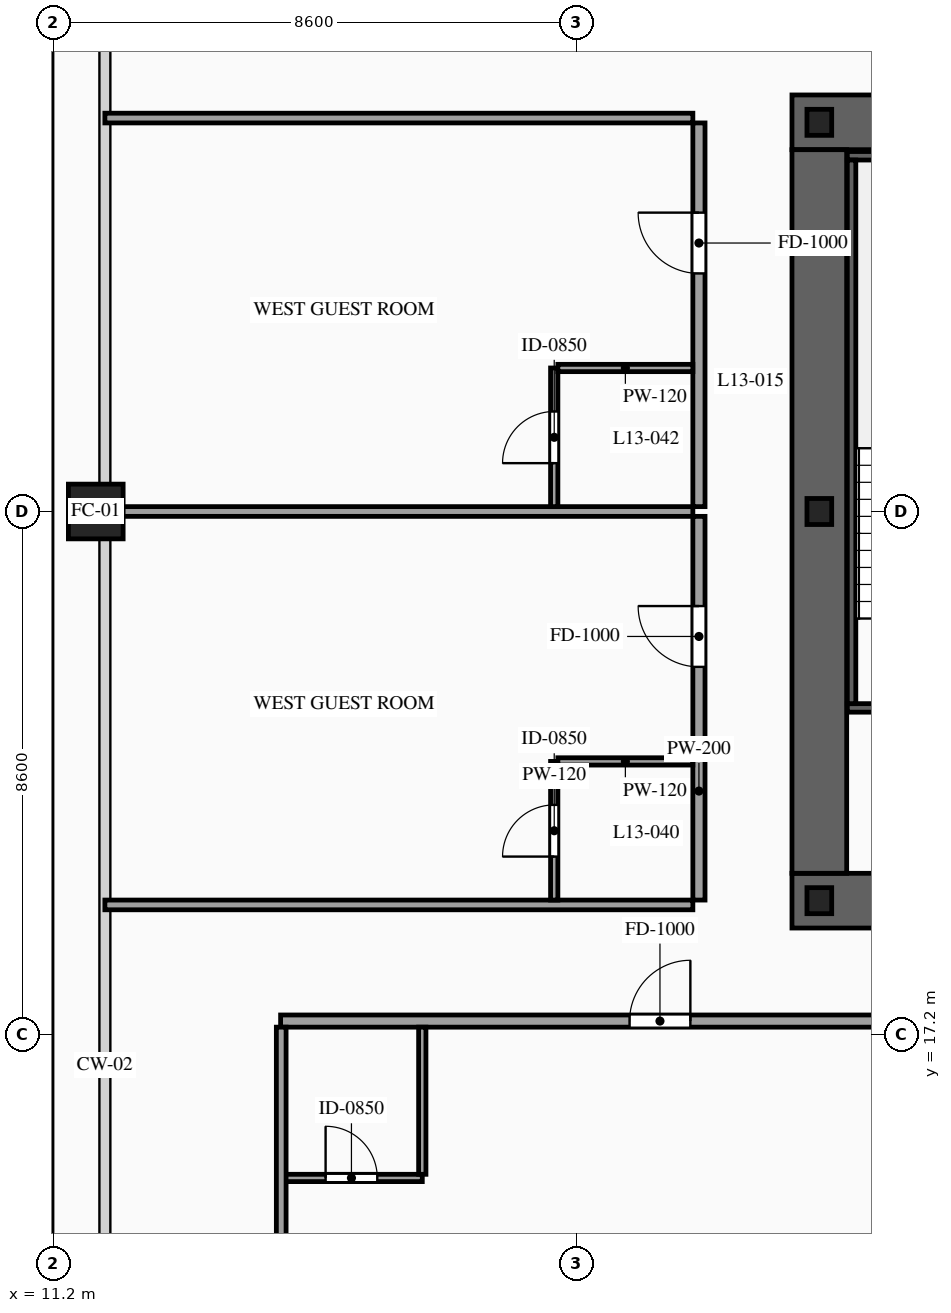
"""IFC4 building model, lengths in metres.
Left out: names, types, materials, properties, quantities, classifications, styles, units other than length and angle.
Written with IfcOpenShell. Run it as: python <this file> out.ifc"""

import sys

from ifc_helpers import new_model, si_unit, direction, frame, frame_2d, origin, origin_2d, place, context, subcontext, project, spatial, rectangle, hollow_rectangle, i_section, extrude, source, transform, mapped, element, fill, save


model = new_model("IFC4")
c1 = context("Model", 3, precision=1e-05, world=origin(), true_north=direction((0.0, 1.0)))
c2 = subcontext(c1, "Body", "Model", "MODEL_VIEW")
j1 = project(units=[si_unit("LENGTHUNIT", "METRE"), si_unit("PLANEANGLEUNIT", "RADIAN")], contexts=[c1])
p1 = place(None, origin())
s1 = spatial("IfcSite", under=j1, at=p1, CompositionType="ELEMENT")
p2 = place(p1, origin())
s2 = spatial("IfcBuilding", under=s1, at=p2, CompositionType="ELEMENT")
p3 = place(p2, frame((0.0, 0.0, 53.2)))
s3 = spatial("IfcBuildingStorey", under=s2, at=p3, CompositionType="ELEMENT", Elevation=53.2)
p4 = place(p3, frame((23.35, 19.4, 0.0), z_axis=(0.0, 0.0, 1.0), x_axis=(1.0, 0.0, 0.0)))
e1 = element("IfcWall", 1, at=p4, inside=s3, PredefinedType="SHEAR", context=c2, shape_type="SweptSolid", body=[
    extrude(rectangle(XDim=27.3, YDim=0.9, at=frame_2d((13.65, 0.0))), origin(), (0.0, 0.0, 1.0), 3.6),
])
p5 = place(p4, frame((2.1, 0.0, 0.0)))
e2 = element("IfcOpeningElement", 2, at=p5, cuts=e1, PredefinedType="OPENING", context=c2, shape_type="SweptSolid", body=[
    extrude(rectangle(XDim=1.1, YDim=2.2, at=frame_2d((0.55, 1.1))), frame((0.0, 0.465, 0.0), z_axis=(0.0, -1.0, 0.0), x_axis=(1.0, 0.0, 0.0)), (0.0, 0.0, 1.0), 0.93),
])
p6 = place(p4, frame((10.0, 0.0, 0.0)))
e3 = element("IfcOpeningElement", 3, at=p6, cuts=e1, PredefinedType="OPENING", context=c2, shape_type="SweptSolid", body=[
    extrude(rectangle(XDim=1.1, YDim=2.2, at=frame_2d((0.55, 1.1))), frame((0.0, 0.465, 0.0), z_axis=(0.0, -1.0, 0.0), x_axis=(1.0, 0.0, 0.0)), (0.0, 0.0, 1.0), 0.93),
])
p7 = place(p4, frame((23.2, 0.0, 0.0)))
e4 = element("IfcOpeningElement", 4, at=p7, cuts=e1, PredefinedType="OPENING", context=c2, shape_type="SweptSolid", body=[
    extrude(rectangle(XDim=1.1, YDim=2.2, at=frame_2d((0.55, 1.1))), frame((0.0, 0.465, 0.0), z_axis=(0.0, -1.0, 0.0), x_axis=(1.0, 0.0, 0.0)), (0.0, 0.0, 1.0), 0.93),
])
p8 = place(p4, frame((19.82, 0.0, 0.0)))
e5 = element("IfcOpeningElement", 5, at=p8, cuts=e1, PredefinedType="OPENING", context=c2, shape_type="SweptSolid", body=[
    extrude(rectangle(XDim=0.9, YDim=2.15, at=frame_2d((0.45, 1.075))), frame((0.0, 0.465, 0.0), z_axis=(0.0, -1.0, 0.0), x_axis=(1.0, 0.0, 0.0)), (0.0, 0.0, 1.0), 0.93),
])
p9 = place(p4, frame((18.38, 0.0, 0.0)))
e6 = element("IfcOpeningElement", 6, at=p9, cuts=e1, PredefinedType="OPENING", context=c2, shape_type="SweptSolid", body=[
    extrude(rectangle(XDim=0.9, YDim=2.15, at=frame_2d((0.45, 1.075))), frame((0.0, 0.465, 0.0), z_axis=(0.0, -1.0, 0.0), x_axis=(1.0, 0.0, 0.0)), (0.0, 0.0, 1.0), 0.93),
])
p10 = place(p3, frame((23.35, 32.2, 0.0), z_axis=(0.0, 0.0, 1.0), x_axis=(1.0, 0.0, 0.0)))
e7 = element("IfcWall", 7, at=p10, inside=s3, PredefinedType="SHEAR", context=c2, shape_type="SweptSolid", body=[
    extrude(rectangle(XDim=27.3, YDim=0.9, at=frame_2d((13.65, 0.0))), origin(), (0.0, 0.0, 1.0), 3.6),
])
p11 = place(p10, frame((4.72, 0.0, 0.0)))
e8 = element("IfcOpeningElement", 8, at=p11, cuts=e7, PredefinedType="OPENING", context=c2, shape_type="SweptSolid", body=[
    extrude(rectangle(XDim=0.9, YDim=2.15, at=frame_2d((0.45, 1.075))), frame((0.0, 0.465, 0.0), z_axis=(0.0, -1.0, 0.0), x_axis=(1.0, 0.0, 0.0)), (0.0, 0.0, 1.0), 0.93),
])
p12 = place(p10, frame((10.0, 0.0, 0.0)))
e9 = element("IfcOpeningElement", 9, at=p12, cuts=e7, PredefinedType="OPENING", context=c2, shape_type="SweptSolid", body=[
    extrude(rectangle(XDim=1.1, YDim=2.2, at=frame_2d((0.55, 1.1))), frame((0.0, 0.465, 0.0), z_axis=(0.0, -1.0, 0.0), x_axis=(1.0, 0.0, 0.0)), (0.0, 0.0, 1.0), 0.93),
])
p13 = place(p10, frame((15.85, 0.0, 0.0)))
e10 = element("IfcOpeningElement", 10, at=p13, cuts=e7, PredefinedType="OPENING", context=c2, shape_type="SweptSolid", body=[
    extrude(rectangle(XDim=1.1, YDim=2.2, at=frame_2d((0.55, 1.1))), frame((0.0, 0.465, 0.0), z_axis=(0.0, -1.0, 0.0), x_axis=(1.0, 0.0, 0.0)), (0.0, 0.0, 1.0), 0.93),
])
p14 = place(p10, frame((19.05, 0.0, 0.0)))
e11 = element("IfcOpeningElement", 11, at=p14, cuts=e7, PredefinedType="OPENING", context=c2, shape_type="SweptSolid", body=[
    extrude(rectangle(XDim=0.9, YDim=2.15, at=frame_2d((0.45, 1.075))), frame((0.0, 0.465, 0.0), z_axis=(0.0, -1.0, 0.0), x_axis=(1.0, 0.0, 0.0)), (0.0, 0.0, 1.0), 0.93),
])
m1 = source(origin(), c2, "Body", "SweptSolid", [
    extrude(rectangle(XDim=11.9, YDim=0.9, at=frame_2d((5.95, 0.0))), origin(), (0.0, 0.0, 1.0), 3.6),
])
p15 = place(p3, frame((23.8, 19.85, 0.0), z_axis=(0.0, 0.0, 1.0), x_axis=(0.0, 1.0, 0.0)))
e12 = element("IfcWall", 12, at=p15, inside=s3, PredefinedType="SHEAR", context=c2, shape_type="MappedRepresentation", body=[
    mapped(m1, transform((0.0, 0.0, 0.0), scale=1.0)),
])
m2 = source(origin(), c2, "Body", "SweptSolid", [
    extrude(i_section(OverallWidth=0.407, OverallDepth=0.428, WebThickness=0.02, FlangeThickness=0.035, at=origin_2d()), origin(), (0.0, 0.0, 1.0), 3.6),
])
for number, where, z_axis, x_axis in (
    (13, (23.8, 19.4, 0.0), (0.0, 0.0, 1.0), (1.0, 0.0, 0.0)),
    (14, (23.8, 25.8, 0.0), (0.0, 0.0, 1.0), (1.0, 0.0, 0.0)),
    (15, (23.8, 32.2, 0.0), (0.0, 0.0, 1.0), (1.0, 0.0, 0.0)),
):
    element("IfcColumn", number, at=place(p3, frame(where, z_axis=z_axis, x_axis=x_axis)), inside=s3, PredefinedType="COLUMN", context=c2, shape_type="MappedRepresentation", body=[
        mapped(m2, transform((0.0, 0.0, 0.0), scale=1.0)),
    ])
m3 = source(origin(), c2, "Body", "SweptSolid", [
    extrude(hollow_rectangle(XDim=0.9, YDim=0.9, WallThickness=0.042, at=origin_2d()), origin(), (0.0, 0.0, 1.0), 3.6),
])
p16 = place(p3, frame((11.9, 25.8, 0.0), z_axis=(0.0, 0.0, 1.0), x_axis=(1.0, 0.0, 0.0)))
e16 = element("IfcColumn", 16, at=p16, inside=s3, PredefinedType="COLUMN", context=c2, shape_type="MappedRepresentation", body=[
    mapped(m3, transform((0.0, 0.0, 0.0), scale=1.0)),
])
p17 = place(p3, frame((24.26, 22.57, 0.0), z_axis=(0.0, 0.0, 1.0), x_axis=(1.0, 0.0, 0.0)))
e17 = element("IfcWall", 17, at=p17, inside=s3, PredefinedType="SOLIDWALL", context=c2, shape_type="SweptSolid", body=[
    extrude(rectangle(XDim=3.28, YDim=0.14, at=frame_2d((1.64, 0.0))), origin(), (0.0, 0.0, 1.0), 3.38),
])
p18 = place(p17, frame((1.09, 0.0, 0.0)))
e18 = element("IfcOpeningElement", 18, at=p18, cuts=e17, PredefinedType="OPENING", context=c2, shape_type="SweptSolid", body=[
    extrude(rectangle(XDim=1.1, YDim=2.2, at=frame_2d((0.55, 1.1))), frame((0.0, 0.085, 0.0), z_axis=(0.0, -1.0, 0.0), x_axis=(1.0, 0.0, 0.0)), (0.0, 0.0, 1.0), 0.17),
])
m4 = source(origin(), c2, "Body", "SweptSolid", [
    extrude(rectangle(XDim=3.28, YDim=0.14, at=frame_2d((1.64, 0.0))), origin(), (0.0, 0.0, 1.0), 3.38),
])
p19 = place(p3, frame((24.26, 31.65, 0.0), z_axis=(0.0, 0.0, 1.0), x_axis=(1.0, 0.0, 0.0)))
e19 = element("IfcWall", 19, at=p19, inside=s3, PredefinedType="SOLIDWALL", context=c2, shape_type="MappedRepresentation", body=[
    mapped(m4, transform((0.0, 0.0, 0.0), scale=1.0)),
])
m5 = source(origin(), c2, "Body", "SweptSolid", [
    extrude(rectangle(XDim=8.94, YDim=0.14, at=frame_2d((4.47, 0.0))), origin(), (0.0, 0.0, 1.0), 3.38),
])
p20 = place(p3, frame((24.33, 22.64, 0.0), z_axis=(0.0, 0.0, 1.0), x_axis=(0.0, 1.0, 0.0)))
e20 = element("IfcWall", 20, at=p20, inside=s3, PredefinedType="SOLIDWALL", context=c2, shape_type="MappedRepresentation", body=[
    mapped(m5, transform((0.0, 0.0, 0.0), scale=1.0)),
])
p21 = place(p3, frame((14.94, 17.42, 0.0), z_axis=(0.0, 0.0, 1.0), x_axis=(1.0, 0.0, 0.0)))
e21 = element("IfcWall", 21, at=p21, inside=s3, PredefinedType="PARTITIONING", context=c2, shape_type="SweptSolid", body=[
    extrude(rectangle(XDim=10.068, YDim=0.2, at=frame_2d((5.034, 0.0))), origin(), (0.0, 0.0, 1.0), 3.38),
])
p22 = place(p21, frame((5.739, 0.0, 0.0)))
e22 = element("IfcOpeningElement", 22, at=p22, cuts=e21, PredefinedType="OPENING", context=c2, shape_type="SweptSolid", body=[
    extrude(rectangle(XDim=1.0, YDim=2.2, at=frame_2d((0.5, 1.1))), frame((0.0, 0.115, 0.0), z_axis=(0.0, -1.0, 0.0), x_axis=(1.0, 0.0, 0.0)), (0.0, 0.0, 1.0), 0.23),
])
p23 = place(p3, frame((14.94, 14.84, 0.0), z_axis=(0.0, 0.0, 1.0), x_axis=(1.0, 0.0, 0.0)))
e23 = element("IfcWall", 23, at=p23, inside=s3, PredefinedType="PARTITIONING", context=c2, shape_type="SweptSolid", body=[
    extrude(rectangle(XDim=2.33, YDim=0.12, at=frame_2d((1.165, 0.0))), origin(), (0.0, 0.0, 1.0), 3.38),
])
p24 = place(p23, frame((0.74, 0.0, 0.0)))
e24 = element("IfcOpeningElement", 24, at=p24, cuts=e23, PredefinedType="OPENING", context=c2, shape_type="SweptSolid", body=[
    extrude(rectangle(XDim=0.85, YDim=2.1, at=frame_2d((0.425, 1.05))), frame((0.0, 0.075, 0.0), z_axis=(0.0, -1.0, 0.0), x_axis=(1.0, 0.0, 0.0)), (0.0, 0.0, 1.0), 0.15),
])
m6 = source(origin(), c2, "Body", "SweptSolid", [
    extrude(rectangle(XDim=2.42, YDim=0.12, at=frame_2d((1.21, 0.0))), origin(), (0.0, 0.0, 1.0), 3.38),
])
p25 = place(p3, frame((17.27, 14.9, 0.0), z_axis=(0.0, 0.0, 1.0), x_axis=(0.0, 1.0, 0.0)))
e25 = element("IfcWall", 25, at=p25, inside=s3, PredefinedType="PARTITIONING", context=c2, shape_type="MappedRepresentation", body=[
    mapped(m6, transform((0.0, 0.0, 0.0), scale=1.0)),
])
m7 = source(origin(), c2, "Body", "SweptSolid", [
    extrude(rectangle(XDim=16.32, YDim=0.16, at=frame_2d((8.16, 0.0))), origin(), (0.0, 0.0, 1.0), 3.38),
])
p26 = place(p3, frame((14.95, 1.0, 0.0), z_axis=(0.0, 0.0, 1.0), x_axis=(0.0, 1.0, 0.0)))
e26 = element("IfcWall", 26, at=p26, inside=s3, PredefinedType="PARTITIONING", context=c2, shape_type="MappedRepresentation", body=[
    mapped(m7, transform((0.0, 0.0, 0.0), scale=1.0)),
])
p27 = place(p3, frame((21.82, 19.41, 0.0), z_axis=(0.0, 0.0, 1.0), x_axis=(0.0, 1.0, 0.0)))
e27 = element("IfcWall", 27, at=p27, inside=s3, PredefinedType="PARTITIONING", context=c2, shape_type="SweptSolid", body=[
    extrude(rectangle(XDim=6.31, YDim=0.2, at=frame_2d((3.155, 0.0))), origin(), (0.0, 0.0, 1.0), 3.38),
])
p28 = place(p27, frame((3.835, 0.0, 0.0)))
e28 = element("IfcOpeningElement", 28, at=p28, cuts=e27, PredefinedType="OPENING", context=c2, shape_type="SweptSolid", body=[
    extrude(rectangle(XDim=1.0, YDim=2.2, at=frame_2d((0.5, 1.1))), frame((0.0, 0.115, 0.0), z_axis=(0.0, -1.0, 0.0), x_axis=(1.0, 0.0, 0.0)), (0.0, 0.0, 1.0), 0.23),
])
m8 = source(origin(), c2, "Body", "SweptSolid", [
    extrude(rectangle(XDim=9.67, YDim=0.16, at=frame_2d((4.835, 0.0))), origin(), (0.0, 0.0, 1.0), 2.575),
])
p29 = place(p3, frame((12.05, 25.8, 0.0), z_axis=(0.0, 0.0, 1.0), x_axis=(1.0, 0.0, 0.0)))
e29 = element("IfcWall", 29, at=p29, inside=s3, PredefinedType="PARTITIONING", context=c2, shape_type="MappedRepresentation", body=[
    mapped(m8, transform((0.0, 0.0, 0.0), scale=1.0)),
])
m9 = source(origin(), c2, "Body", "SweptSolid", [
    extrude(rectangle(XDim=9.67, YDim=0.16, at=frame_2d((4.835, 0.0))), origin(), (0.0, 0.0, 1.0), 2.875),
])
p30 = place(p3, frame((12.05, 19.33, 0.0), z_axis=(0.0, 0.0, 1.0), x_axis=(1.0, 0.0, 0.0)))
e30 = element("IfcWall", 30, at=p30, inside=s3, PredefinedType="PARTITIONING", context=c2, shape_type="MappedRepresentation", body=[
    mapped(m9, transform((0.0, 0.0, 0.0), scale=1.0)),
])
p31 = place(p3, frame((19.44, 19.41, 0.0), z_axis=(0.0, 0.0, 1.0), x_axis=(0.0, 1.0, 0.0)))
e31 = element("IfcWall", 31, at=p31, inside=s3, PredefinedType="PARTITIONING", context=c2, shape_type="SweptSolid", body=[
    extrude(rectangle(XDim=2.28, YDim=0.12, at=frame_2d((1.14, 0.0))), origin(), (0.0, 0.0, 1.0), 3.38),
])
p32 = place(p31, frame((0.715, 0.0, 0.0)))
e32 = element("IfcOpeningElement", 32, at=p32, cuts=e31, PredefinedType="OPENING", context=c2, shape_type="SweptSolid", body=[
    extrude(rectangle(XDim=0.85, YDim=2.1, at=frame_2d((0.425, 1.05))), frame((0.0, 0.075, 0.0), z_axis=(0.0, -1.0, 0.0), x_axis=(1.0, 0.0, 0.0)), (0.0, 0.0, 1.0), 0.15),
])
m10 = source(origin(), c2, "Body", "SweptSolid", [
    extrude(rectangle(XDim=2.22, YDim=0.12, at=frame_2d((1.11, 0.0))), origin(), (0.0, 0.0, 1.0), 3.38),
])
p33 = place(p3, frame((19.5, 21.69, 0.0), z_axis=(0.0, 0.0, 1.0), x_axis=(1.0, 0.0, 0.0)))
e33 = element("IfcWall", 33, at=p33, inside=s3, PredefinedType="PARTITIONING", context=c2, shape_type="MappedRepresentation", body=[
    mapped(m10, transform((0.0, 0.0, 0.0), scale=1.0)),
])
p34 = place(p3, frame((21.82, 25.88, 0.0), z_axis=(0.0, 0.0, 1.0), x_axis=(0.0, 1.0, 0.0)))
e34 = element("IfcWall", 34, at=p34, inside=s3, PredefinedType="PARTITIONING", context=c2, shape_type="SweptSolid", body=[
    extrude(rectangle(XDim=6.31, YDim=0.2, at=frame_2d((3.155, 0.0))), origin(), (0.0, 0.0, 1.0), 3.38),
])
p35 = place(p34, frame((3.835, 0.0, 0.0)))
e35 = element("IfcOpeningElement", 35, at=p35, cuts=e34, PredefinedType="OPENING", context=c2, shape_type="SweptSolid", body=[
    extrude(rectangle(XDim=1.0, YDim=2.2, at=frame_2d((0.5, 1.1))), frame((0.0, 0.115, 0.0), z_axis=(0.0, -1.0, 0.0), x_axis=(1.0, 0.0, 0.0)), (0.0, 0.0, 1.0), 0.23),
])
p36 = place(p3, frame((12.05, 32.27, 0.0), z_axis=(0.0, 0.0, 1.0), x_axis=(1.0, 0.0, 0.0)))
e36 = element("IfcWall", 36, at=p36, inside=s3, PredefinedType="PARTITIONING", context=c2, shape_type="MappedRepresentation", body=[
    mapped(m9, transform((0.0, 0.0, 0.0), scale=1.0)),
])
p37 = place(p3, frame((19.44, 25.88, 0.0), z_axis=(0.0, 0.0, 1.0), x_axis=(0.0, 1.0, 0.0)))
e37 = element("IfcWall", 37, at=p37, inside=s3, PredefinedType="PARTITIONING", context=c2, shape_type="SweptSolid", body=[
    extrude(rectangle(XDim=2.28, YDim=0.12, at=frame_2d((1.14, 0.0))), origin(), (0.0, 0.0, 1.0), 3.38),
])
p38 = place(p37, frame((0.715, 0.0, 0.0)))
e38 = element("IfcOpeningElement", 38, at=p38, cuts=e37, PredefinedType="OPENING", context=c2, shape_type="SweptSolid", body=[
    extrude(rectangle(XDim=0.85, YDim=2.1, at=frame_2d((0.425, 1.05))), frame((0.0, 0.075, 0.0), z_axis=(0.0, -1.0, 0.0), x_axis=(1.0, 0.0, 0.0)), (0.0, 0.0, 1.0), 0.15),
])
p39 = place(p3, frame((19.5, 28.16, 0.0), z_axis=(0.0, 0.0, 1.0), x_axis=(1.0, 0.0, 0.0)))
e39 = element("IfcWall", 39, at=p39, inside=s3, PredefinedType="PARTITIONING", context=c2, shape_type="MappedRepresentation", body=[
    mapped(m10, transform((0.0, 0.0, 0.0), scale=1.0)),
])
m11 = source(origin(), c2, "Body", "SweptSolid", [
    extrude(rectangle(XDim=1.0, YDim=2.2, at=frame_2d((0.5, 1.1))), frame((0.0, 0.025, 0.0), z_axis=(0.0, -1.0, 0.0), x_axis=(1.0, 0.0, 0.0)), (0.0, 0.0, 1.0), 0.05),
])
p40 = place(p22, origin())
e40 = element("IfcDoor", 40, at=p40, inside=s3, OperationType="SINGLE_SWING_RIGHT", PredefinedType="DOOR", context=c2, shape_type="MappedRepresentation", body=[
    mapped(m11, transform((0.0, 0.0, 0.0), scale=1.0)),
])
fill(e22, e40)
m12 = source(origin(), c2, "Body", "SweptSolid", [
    extrude(rectangle(XDim=0.85, YDim=2.1, at=frame_2d((0.425, 1.05))), frame((0.0, 0.025, 0.0), z_axis=(0.0, -1.0, 0.0), x_axis=(1.0, 0.0, 0.0)), (0.0, 0.0, 1.0), 0.05),
])
p41 = place(p24, origin())
e41 = element("IfcDoor", 41, at=p41, inside=s3, OperationType="SINGLE_SWING_LEFT", PredefinedType="DOOR", context=c2, shape_type="MappedRepresentation", body=[
    mapped(m12, transform((0.0, 0.0, 0.0), scale=1.0)),
])
fill(e24, e41)
p42 = place(p28, origin())
e42 = element("IfcDoor", 42, at=p42, inside=s3, OperationType="SINGLE_SWING_RIGHT", PredefinedType="DOOR", context=c2, shape_type="MappedRepresentation", body=[
    mapped(m11, transform((0.0, 0.0, 0.0), scale=1.0)),
])
fill(e28, e42)
p43 = place(p32, origin())
e43 = element("IfcDoor", 43, at=p43, inside=s3, OperationType="SINGLE_SWING_LEFT", PredefinedType="DOOR", context=c2, shape_type="MappedRepresentation", body=[
    mapped(m12, transform((0.0, 0.0, 0.0), scale=1.0)),
])
fill(e32, e43)
p44 = place(p35, origin())
e44 = element("IfcDoor", 44, at=p44, inside=s3, OperationType="SINGLE_SWING_RIGHT", PredefinedType="DOOR", context=c2, shape_type="MappedRepresentation", body=[
    mapped(m11, transform((0.0, 0.0, 0.0), scale=1.0)),
])
fill(e35, e44)
p45 = place(p38, origin())
e45 = element("IfcDoor", 45, at=p45, inside=s3, OperationType="SINGLE_SWING_LEFT", PredefinedType="DOOR", context=c2, shape_type="MappedRepresentation", body=[
    mapped(m12, transform((0.0, 0.0, 0.0), scale=1.0)),
])
fill(e38, e45)
save(model, sys.argv[1])
